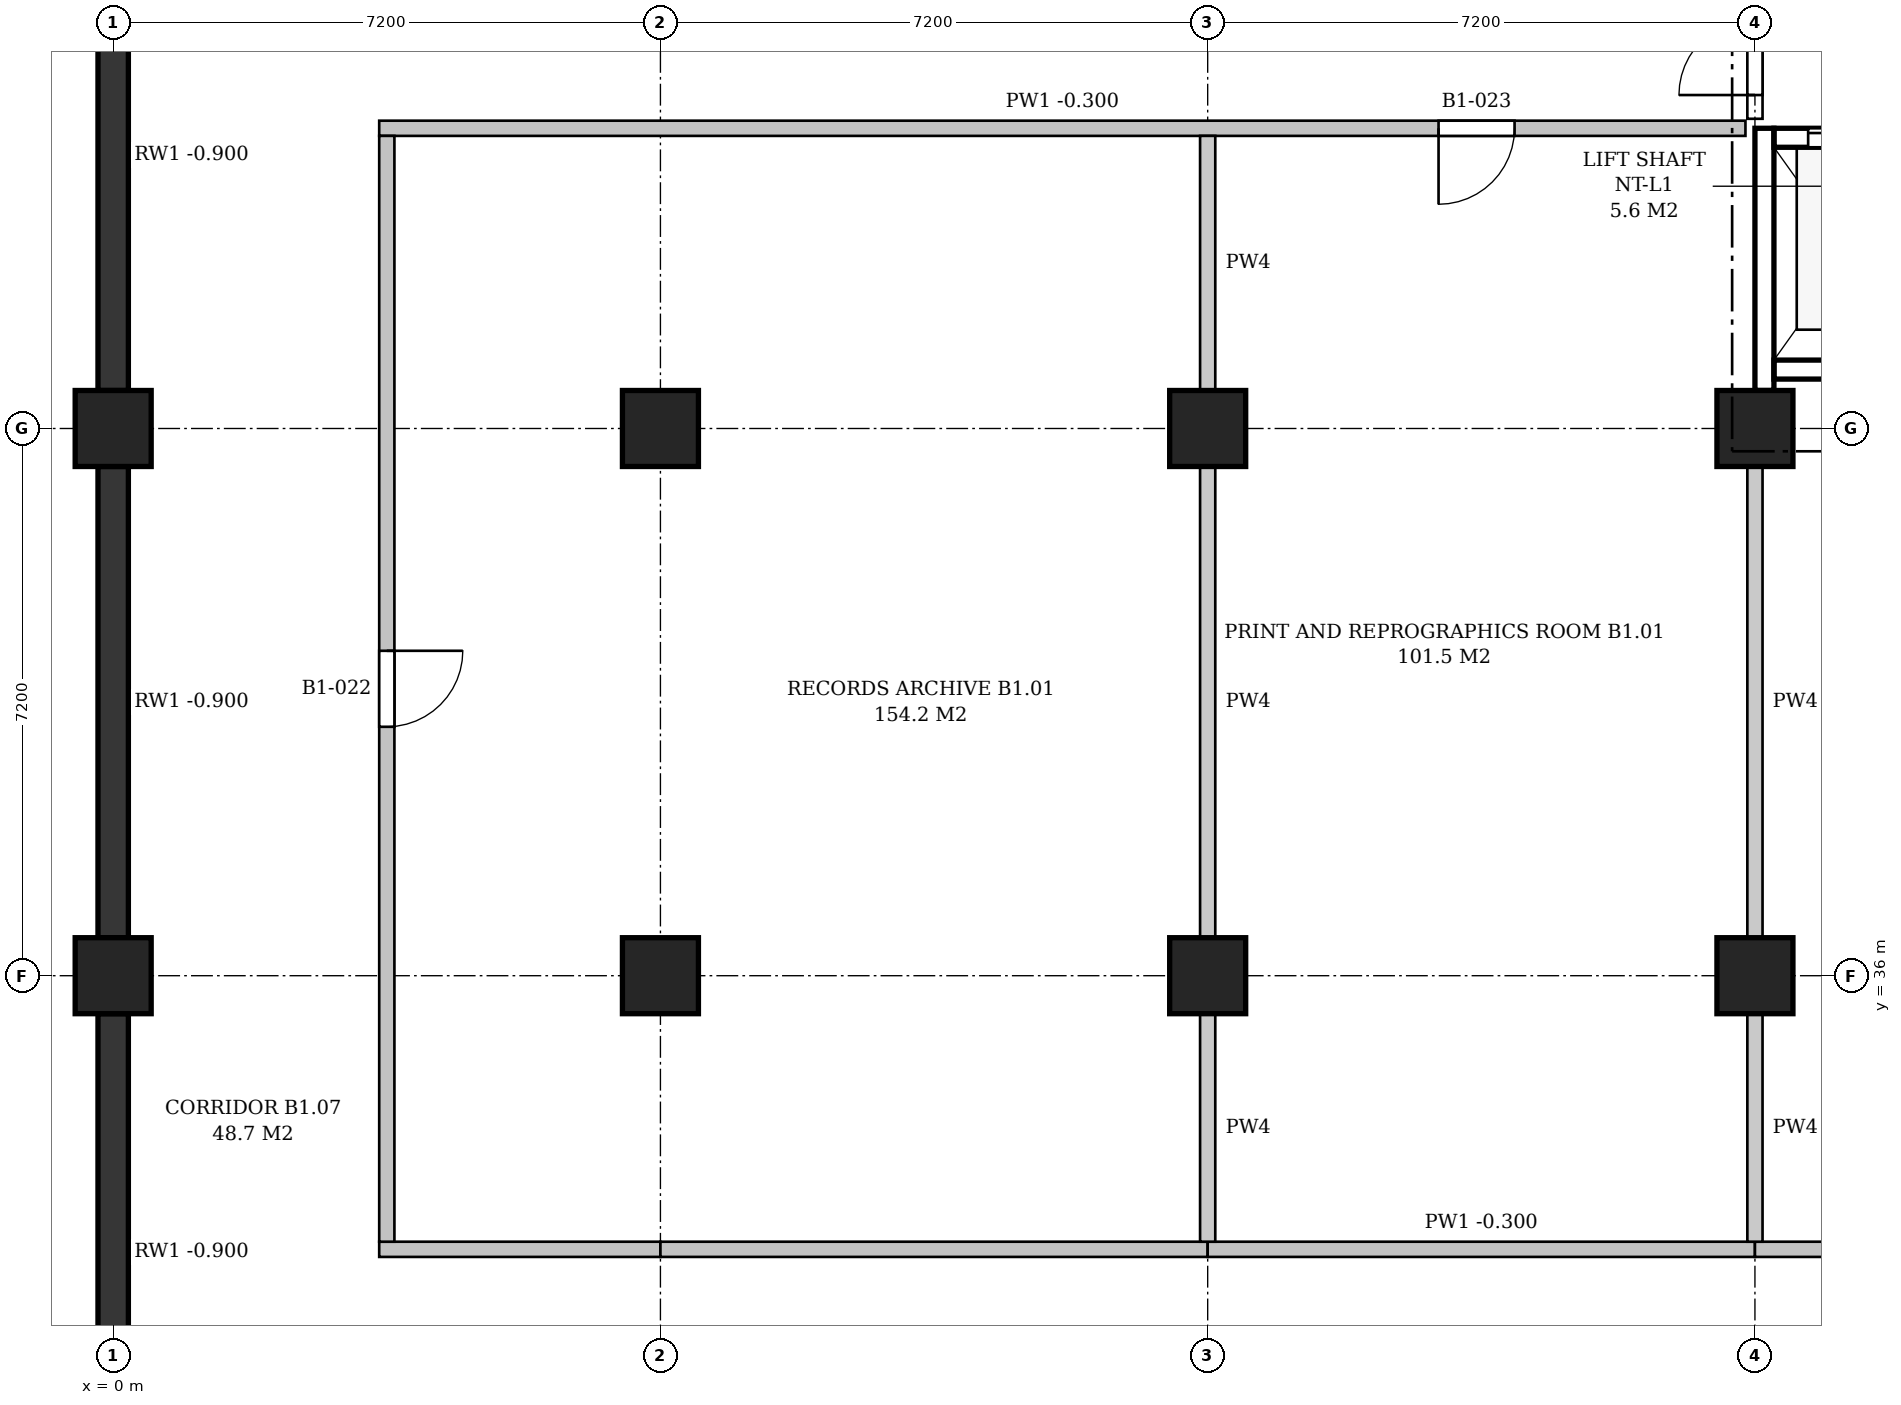
"""IFC4 building model, lengths in metres.
Left out: names, types, materials, properties, quantities, classifications, styles, units other than length and angle.
Written with IfcOpenShell. Run it as: python <this file> out.ifc"""

import sys

from ifc_helpers import new_model, si_unit, direction, frame, frame_2d, origin, origin_2d, place, context, subcontext, project, spatial, polyline, rectangle, outline, extrude, element, fill, save


model = new_model("IFC4")
c1 = context("Model", 3, precision=1e-05, world=origin(), true_north=direction((0.0, 1.0)))
c2 = subcontext(c1, "Body", "Model", "MODEL_VIEW")
j1 = project(units=[si_unit("LENGTHUNIT", "METRE"), si_unit("PLANEANGLEUNIT", "RADIAN")], contexts=[c1])
p1 = place(None, origin())
s1 = spatial("IfcSite", under=j1, at=p1, CompositionType="ELEMENT")
p2 = place(p1, origin())
s2 = spatial("IfcBuilding", under=s1, at=p2, CompositionType="ELEMENT")
p3 = place(p2, frame((0.0, 0.0, -4.5)))
s3 = spatial("IfcBuildingStorey", under=s2, at=p3, CompositionType="ELEMENT", Elevation=-4.5)
for number, where, z_axis, x_axis in (
    (1, (0.0, 36.0, 0.0), (0.0, 0.0, 1.0), (1.0, 0.0, 0.0)),
    (2, (0.0, 43.2, 0.0), (0.0, 0.0, 1.0), (1.0, 0.0, 0.0)),
    (3, (7.2, 36.0, 0.0), (0.0, 0.0, 1.0), (1.0, 0.0, 0.0)),
    (4, (7.2, 43.2, 0.0), (0.0, 0.0, 1.0), (1.0, 0.0, 0.0)),
    (5, (14.4, 36.0, 0.0), (0.0, 0.0, 1.0), (1.0, 0.0, 0.0)),
    (6, (14.4, 43.2, 0.0), (0.0, 0.0, 1.0), (1.0, 0.0, 0.0)),
    (7, (21.6, 36.0, 0.0), (0.0, 0.0, 1.0), (1.0, 0.0, 0.0)),
    (8, (21.6, 43.2, 0.0), (0.0, 0.0, 1.0), (1.0, 0.0, 0.0)),
):
    element("IfcColumn", number, at=place(p3, frame(where, z_axis=z_axis, x_axis=x_axis)), inside=s3, PredefinedType="COLUMN", context=c2, shape_type="SweptSolid", body=[
        extrude(rectangle(XDim=1.0, YDim=1.0, at=origin_2d()), origin(), (0.0, 0.0, 1.0), 4.5),
    ])
for number, where, z_axis, x_axis in (
    (9, (0.0, 49.9, 0.0), (0.0, 0.0, 1.0), (0.0, -1.0, 0.0)),
    (10, (0.0, 42.7, 0.0), (0.0, 0.0, 1.0), (0.0, -1.0, 0.0)),
):
    element("IfcWall", number, at=place(p3, frame(where, z_axis=z_axis, x_axis=x_axis)), inside=s3, PredefinedType="SOLIDWALL", context=c2, shape_type="SweptSolid", body=[
        extrude(rectangle(XDim=6.2, YDim=0.4, at=frame_2d((3.1, 0.0))), origin(), (0.0, 0.0, 1.0), 3.6),
    ])
p4 = place(p3, frame((0.0, 35.5, 0.0), z_axis=(0.0, 0.0, 1.0), x_axis=(0.0, -1.0, 0.0)))
e11 = element("IfcWall", 11, at=p4, inside=s3, PredefinedType="SOLIDWALL", context=c2, shape_type="SweptSolid", body=[
    extrude(rectangle(XDim=6.275, YDim=0.4, at=frame_2d((3.137, 0.0))), origin(), (0.0, 0.0, 1.0), 3.6),
])
p5 = place(p3, frame((21.725, 43.7, -1.6), z_axis=(0.0, 0.0, 1.0), x_axis=(0.0, 1.0, 0.0)))
e12 = element("IfcWall", 12, at=p5, inside=s3, PredefinedType="SHEAR", context=c2, shape_type="SweptSolid", body=[
    extrude(rectangle(XDim=3.45, YDim=0.25, at=frame_2d((1.725, 0.0))), origin(), (0.0, 0.0, 1.0), 5.0),
])
p6 = place(p3, frame((21.85, 47.025, 0.0), z_axis=(0.0, 0.0, 1.0), x_axis=(1.0, 0.0, 0.0)))
e13 = element("IfcWall", 13, at=p6, inside=s3, PredefinedType="SHEAR", context=c2, shape_type="SweptSolid", body=[
    extrude(rectangle(XDim=2.0, YDim=0.25, at=frame_2d((1.0, 0.0))), origin(), (0.0, 0.0, 1.0), 4.2),
])
p7 = place(p6, frame((0.45, 0.0, 0.0)))
e14 = element("IfcOpeningElement", 14, at=p7, cuts=e13, PredefinedType="OPENING", context=c2, shape_type="SweptSolid", body=[
    extrude(rectangle(XDim=1.1, YDim=2.1, at=frame_2d((0.55, 1.05))), frame((0.0, 0.135, 0.0), z_axis=(0.0, -1.0, 0.0), x_axis=(1.0, 0.0, 0.0)), (0.0, 0.0, 1.0), 0.27),
])
p8 = place(p3, frame((21.85, 43.975, -1.6), z_axis=(0.0, 0.0, 1.0), x_axis=(1.0, 0.0, 0.0)))
e15 = element("IfcWall", 15, at=p8, inside=s3, PredefinedType="SHEAR", context=c2, shape_type="SweptSolid", body=[
    extrude(rectangle(XDim=2.0, YDim=0.25, at=frame_2d((1.0, 0.0))), origin(), (0.0, 0.0, 1.0), 5.8),
])
p9 = place(p3, frame((3.5, 32.4, 0.0), z_axis=(0.0, 0.0, 1.0), x_axis=(1.0, 0.0, 0.0)))
e16 = element("IfcWall", 16, at=p9, inside=s3, PredefinedType="PARTITIONING", context=c2, shape_type="SweptSolid", body=[
    extrude(outline(polyline([(0.0, 0.0), (3.7, 0.0), (3.7, 3.4), (3.4, 3.4), (3.4, 4.2), (0.0, 4.2), (0.0, 0.0)])), frame((0.0, 0.1, 0.0), z_axis=(0.0, -1.0, 0.0), x_axis=(1.0, 0.0, 0.0)), (0.0, 0.0, 1.0), 0.2),
])
p10 = place(p3, frame((7.2, 32.4, 0.0), z_axis=(0.0, 0.0, 1.0), x_axis=(1.0, 0.0, 0.0)))
e17 = element("IfcWall", 17, at=p10, inside=s3, PredefinedType="PARTITIONING", context=c2, shape_type="SweptSolid", body=[
    extrude(outline(polyline([(0.0, 0.0), (7.2, 0.0), (7.2, 3.4), (6.9, 3.4), (6.9, 4.2), (0.3, 4.2), (0.3, 3.4), (0.0, 3.4), (0.0, 0.0)])), frame((0.0, 0.1, 0.0), z_axis=(0.0, -1.0, 0.0), x_axis=(1.0, 0.0, 0.0)), (0.0, 0.0, 1.0), 0.2),
])
p11 = place(p3, frame((14.4, 32.4, 0.0), z_axis=(0.0, 0.0, 1.0), x_axis=(1.0, 0.0, 0.0)))
e18 = element("IfcWall", 18, at=p11, inside=s3, PredefinedType="PARTITIONING", context=c2, shape_type="SweptSolid", body=[
    extrude(outline(polyline([(0.0, 0.0), (7.2, 0.0), (7.2, 3.4), (6.9, 3.4), (6.9, 4.2), (0.3, 4.2), (0.3, 3.4), (0.0, 3.4), (0.0, 0.0)])), frame((0.0, 0.1, 0.0), z_axis=(0.0, -1.0, 0.0), x_axis=(1.0, 0.0, 0.0)), (0.0, 0.0, 1.0), 0.2),
])
p12 = place(p3, frame((21.6, 32.4, 0.0), z_axis=(0.0, 0.0, 1.0), x_axis=(1.0, 0.0, 0.0)))
e19 = element("IfcWall", 19, at=p12, inside=s3, PredefinedType="PARTITIONING", context=c2, shape_type="SweptSolid", body=[
    extrude(outline(polyline([(0.0, 0.0), (7.2, 0.0), (7.2, 3.4), (6.9, 3.4), (6.9, 4.2), (0.3, 4.2), (0.3, 3.4), (0.0, 3.4), (0.0, 0.0)])), frame((0.0, 0.1, 0.0), z_axis=(0.0, -1.0, 0.0), x_axis=(1.0, 0.0, 0.0)), (0.0, 0.0, 1.0), 0.2),
])
p13 = place(p12, frame((3.1, 0.0, 0.0)))
e20 = element("IfcOpeningElement", 20, at=p13, cuts=e19, PredefinedType="OPENING", context=c2, shape_type="SweptSolid", body=[
    extrude(rectangle(XDim=1.0, YDim=2.1, at=frame_2d((0.5, 1.05))), frame((0.0, 0.11, 0.0), z_axis=(0.0, -1.0, 0.0), x_axis=(1.0, 0.0, 0.0)), (0.0, 0.0, 1.0), 0.22),
])
p14 = place(p3, frame((3.5, 47.15, 0.0), z_axis=(0.0, 0.0, 1.0), x_axis=(1.0, 0.0, 0.0)))
e21 = element("IfcWall", 21, at=p14, inside=s3, PredefinedType="PARTITIONING", context=c2, shape_type="SweptSolid", body=[
    extrude(outline(polyline([(0.0, 0.0), (17.975, 0.0), (17.975, 3.4), (17.8, 3.4), (17.8, 4.2), (11.2, 4.2), (11.2, 3.4), (10.6, 3.4), (10.6, 4.2), (4.0, 4.2), (4.0, 3.4), (3.4, 3.4), (3.4, 4.2), (0.0, 4.2), (0.0, 0.0)])), frame((0.0, 0.1, 0.0), z_axis=(0.0, -1.0, 0.0), x_axis=(1.0, 0.0, 0.0)), (0.0, 0.0, 1.0), 0.2),
])
p15 = place(p14, frame((13.938, 0.0, 0.0)))
e22 = element("IfcOpeningElement", 22, at=p15, cuts=e21, PredefinedType="OPENING", context=c2, shape_type="SweptSolid", body=[
    extrude(rectangle(XDim=1.0, YDim=2.1, at=frame_2d((0.5, 1.05))), frame((0.0, 0.11, 0.0), z_axis=(0.0, -1.0, 0.0), x_axis=(1.0, 0.0, 0.0)), (0.0, 0.0, 1.0), 0.22),
])
p16 = place(p3, frame((3.6, 32.5, 0.0), z_axis=(0.0, 0.0, 1.0), x_axis=(0.0, 1.0, 0.0)))
e23 = element("IfcWall", 23, at=p16, inside=s3, PredefinedType="PARTITIONING", context=c2, shape_type="SweptSolid", body=[
    extrude(outline(polyline([(0.0, 0.0), (14.55, 0.0), (14.55, 4.2), (11.0, 4.2), (11.0, 3.4), (10.4, 3.4), (10.4, 4.2), (3.8, 4.2), (3.8, 3.4), (3.2, 3.4), (3.2, 4.2), (0.0, 4.2), (0.0, 0.0)])), frame((0.0, 0.1, 0.0), z_axis=(0.0, -1.0, 0.0), x_axis=(1.0, 0.0, 0.0)), (0.0, 0.0, 1.0), 0.2),
])
p17 = place(p16, frame((6.775, 0.0, 0.0)))
e24 = element("IfcOpeningElement", 24, at=p17, cuts=e23, PredefinedType="OPENING", context=c2, shape_type="SweptSolid", body=[
    extrude(rectangle(XDim=1.0, YDim=2.1, at=frame_2d((0.5, 1.05))), frame((0.0, 0.11, 0.0), z_axis=(0.0, -1.0, 0.0), x_axis=(1.0, 0.0, 0.0)), (0.0, 0.0, 1.0), 0.22),
])
p18 = place(p3, frame((14.4, 32.5, 0.0), z_axis=(0.0, 0.0, 1.0), x_axis=(0.0, 1.0, 0.0)))
e25 = element("IfcWall", 25, at=p18, inside=s3, PredefinedType="PARTITIONING", context=c2, shape_type="SweptSolid", body=[
    extrude(rectangle(XDim=3.0, YDim=0.2, at=frame_2d((1.5, 0.0))), origin(), (0.0, 0.0, 1.0), 3.4),
])
p19 = place(p3, frame((14.4, 36.5, 0.0), z_axis=(0.0, 0.0, 1.0), x_axis=(0.0, 1.0, 0.0)))
e26 = element("IfcWall", 26, at=p19, inside=s3, PredefinedType="PARTITIONING", context=c2, shape_type="SweptSolid", body=[
    extrude(rectangle(XDim=6.2, YDim=0.2, at=frame_2d((3.1, 0.0))), origin(), (0.0, 0.0, 1.0), 3.4),
])
p20 = place(p3, frame((14.4, 43.7, 0.0), z_axis=(0.0, 0.0, 1.0), x_axis=(0.0, 1.0, 0.0)))
e27 = element("IfcWall", 27, at=p20, inside=s3, PredefinedType="PARTITIONING", context=c2, shape_type="SweptSolid", body=[
    extrude(rectangle(XDim=3.35, YDim=0.2, at=frame_2d((1.675, 0.0))), origin(), (0.0, 0.0, 1.0), 3.4),
])
p21 = place(p3, frame((21.6, 32.5, 0.0), z_axis=(0.0, 0.0, 1.0), x_axis=(0.0, 1.0, 0.0)))
e28 = element("IfcWall", 28, at=p21, inside=s3, PredefinedType="PARTITIONING", context=c2, shape_type="SweptSolid", body=[
    extrude(rectangle(XDim=3.0, YDim=0.2, at=frame_2d((1.5, 0.0))), origin(), (0.0, 0.0, 1.0), 3.4),
])
p22 = place(p3, frame((21.6, 36.5, 0.0), z_axis=(0.0, 0.0, 1.0), x_axis=(0.0, 1.0, 0.0)))
e29 = element("IfcWall", 29, at=p22, inside=s3, PredefinedType="PARTITIONING", context=c2, shape_type="SweptSolid", body=[
    extrude(rectangle(XDim=6.2, YDim=0.2, at=frame_2d((3.1, 0.0))), origin(), (0.0, 0.0, 1.0), 3.4),
])
p23 = place(p3, frame((21.6, 47.275, 0.0), z_axis=(0.0, 0.0, 1.0), x_axis=(0.0, 1.0, 0.0)))
e30 = element("IfcWall", 30, at=p23, inside=s3, PredefinedType="PARTITIONING", context=c2, shape_type="SweptSolid", body=[
    extrude(rectangle(XDim=2.625, YDim=0.2, at=frame_2d((1.312, 0.0))), origin(), (0.0, 0.0, 1.0), 3.4),
])
p24 = place(p23, frame((0.312, 0.0, 0.0)))
e31 = element("IfcOpeningElement", 31, at=p24, cuts=e30, PredefinedType="OPENING", context=c2, shape_type="SweptSolid", body=[
    extrude(rectangle(XDim=2.0, YDim=2.4, at=frame_2d((1.0, 1.2))), frame((0.0, 0.11, 0.0), z_axis=(0.0, -1.0, 0.0), x_axis=(1.0, 0.0, 0.0)), (0.0, 0.0, 1.0), 0.22),
])
p25 = place(p7, origin())
e32 = element("IfcDoor", 32, at=p25, inside=s3, OperationType="SLIDING_TO_LEFT", PredefinedType="DOOR", context=c2, shape_type="SweptSolid", body=[
    extrude(rectangle(XDim=1.1, YDim=2.1, at=frame_2d((0.55, 1.05))), frame((0.0, 0.025, 0.0), z_axis=(0.0, -1.0, 0.0), x_axis=(1.0, 0.0, 0.0)), (0.0, 0.0, 1.0), 0.05),
])
fill(e14, e32)
p26 = place(p24, origin())
e33 = element("IfcDoor", 33, at=p26, inside=s3, OperationType="DOUBLE_DOOR_SINGLE_SWING", PredefinedType="DOOR", context=c2, shape_type="SweptSolid", body=[
    extrude(rectangle(XDim=2.0, YDim=2.4, at=frame_2d((1.0, 1.2))), frame((0.0, 0.025, 0.0), z_axis=(0.0, -1.0, 0.0), x_axis=(1.0, 0.0, 0.0)), (0.0, 0.0, 1.0), 0.05),
])
fill(e31, e33)
p27 = place(p17, frame((1.0, 0.0, 0.0), z_axis=(0.0, 0.0, 1.0), x_axis=(-1.0, 0.0, 0.0)))
e34 = element("IfcDoor", 34, at=p27, inside=s3, OperationType="SINGLE_SWING_LEFT", PredefinedType="DOOR", context=c2, shape_type="SweptSolid", body=[
    extrude(rectangle(XDim=1.0, YDim=2.1, at=frame_2d((0.5, 1.05))), frame((0.0, 0.025, 0.0), z_axis=(0.0, -1.0, 0.0), x_axis=(1.0, 0.0, 0.0)), (0.0, 0.0, 1.0), 0.05),
])
fill(e24, e34)
p28 = place(p15, frame((1.0, 0.0, 0.0), z_axis=(0.0, 0.0, 1.0), x_axis=(-1.0, 0.0, 0.0)))
e35 = element("IfcDoor", 35, at=p28, inside=s3, OperationType="SINGLE_SWING_RIGHT", PredefinedType="DOOR", context=c2, shape_type="SweptSolid", body=[
    extrude(rectangle(XDim=1.0, YDim=2.1, at=frame_2d((0.5, 1.05))), frame((0.0, 0.025, 0.0), z_axis=(0.0, -1.0, 0.0), x_axis=(1.0, 0.0, 0.0)), (0.0, 0.0, 1.0), 0.05),
])
fill(e22, e35)
save(model, sys.argv[1])
